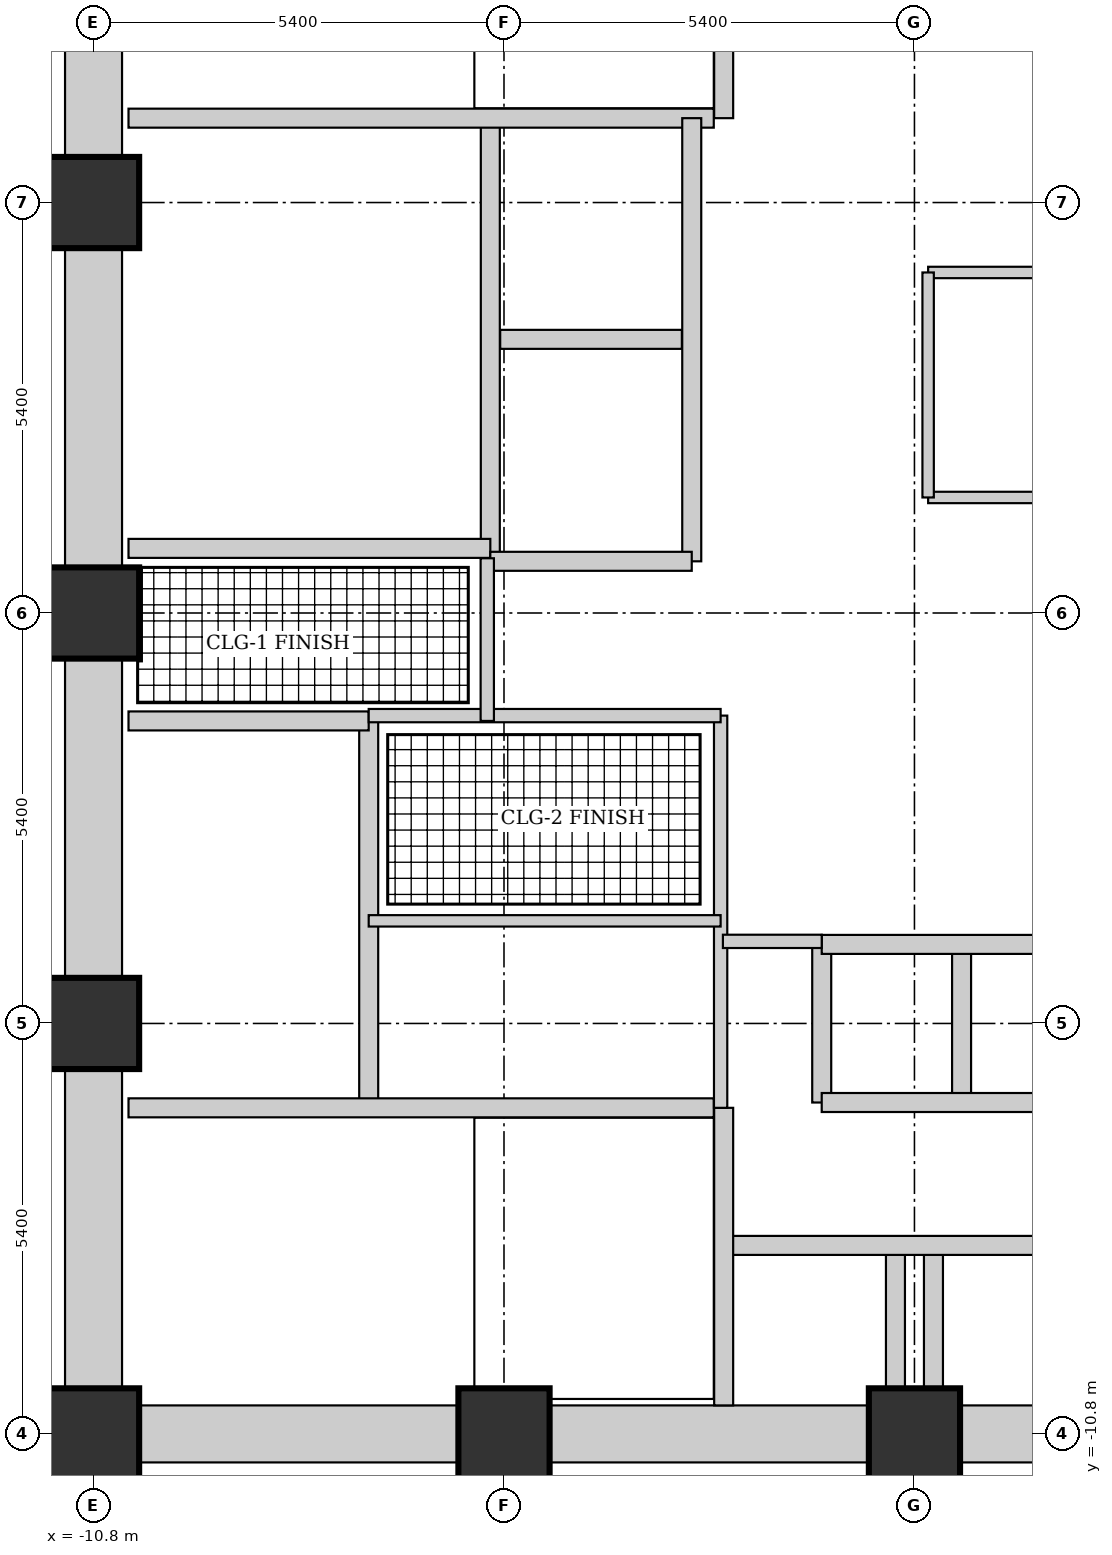
"""IFC4 building model, lengths in metres.
Left out: names, types, materials, properties, quantities, classifications, styles, units other than length and angle.
Written with IfcOpenShell. Run it as: python <this file> out.ifc"""

import sys

from ifc_helpers import new_model, si_unit, direction, frame, frame_2d, origin, origin_2d, place, context, subcontext, project, spatial, rectangle, extrude, element, fill, save


model = new_model("IFC4")
c1 = context("Model", 3, precision=1e-05, world=origin(), true_north=direction((0.0, 1.0)))
c2 = subcontext(c1, "Body", "Model", "MODEL_VIEW")
j1 = project(units=[si_unit("LENGTHUNIT", "METRE"), si_unit("PLANEANGLEUNIT", "RADIAN")], contexts=[c1])
p1 = place(None, origin())
s1 = spatial("IfcSite", under=j1, at=p1, CompositionType="ELEMENT")
p2 = place(p1, origin())
s2 = spatial("IfcBuilding", under=s1, at=p2, CompositionType="ELEMENT")
p3 = place(p2, frame((0.0, 0.0, 22.5)))
s3 = spatial("IfcBuildingStorey", under=s2, at=p3, CompositionType="ELEMENT", Elevation=22.5)
for number, where, z_axis, x_axis in (
    (1, (-10.8, -10.8, 0.0), (0.0, 0.0, 1.0), (1.0, 0.0, 0.0)),
    (2, (-10.8, -5.4, 0.0), (0.0, 0.0, 1.0), (1.0, 0.0, 0.0)),
    (3, (-10.8, 0.0, 0.0), (0.0, 0.0, 1.0), (1.0, 0.0, 0.0)),
    (4, (-10.8, 5.4, 0.0), (0.0, 0.0, 1.0), (1.0, 0.0, 0.0)),
    (5, (-5.4, -10.8, 0.0), (0.0, 0.0, 1.0), (1.0, 0.0, 0.0)),
    (6, (0.0, -10.8, 0.0), (0.0, 0.0, 1.0), (1.0, 0.0, 0.0)),
):
    element("IfcColumn", number, at=place(p3, frame(where, z_axis=z_axis, x_axis=x_axis)), inside=s3, PredefinedType="COLUMN", context=c2, shape_type="SweptSolid", body=[
        extrude(rectangle(XDim=1.2, YDim=1.2, at=origin_2d()), origin(), (0.0, 0.0, 1.0), 3.75),
    ])
for number, where, z_axis, x_axis in (
    (7, (-10.19, -10.8, 0.0), (0.0, 0.0, 1.0), (1.0, 0.0, 0.0)),
    (8, (-10.8, -10.19, 0.0), (0.0, 0.0, 1.0), (0.0, 1.0, 0.0)),
    (9, (-4.79, -10.8, 0.0), (0.0, 0.0, 1.0), (1.0, 0.0, 0.0)),
):
    element("IfcWall", number, at=place(p3, frame(where, z_axis=z_axis, x_axis=x_axis)), inside=s3, PredefinedType="SHEAR", context=c2, shape_type="SweptSolid", body=[
        extrude(rectangle(XDim=4.18, YDim=0.75, at=frame_2d((2.09, 0.0))), origin(), (0.0, 0.0, 1.0), 3.75),
    ])
p4 = place(p3, frame((-10.8, -4.79, 0.0), z_axis=(0.0, 0.0, 1.0), x_axis=(0.0, 1.0, 0.0)))
e10 = element("IfcWall", 10, at=p4, inside=s3, PredefinedType="SHEAR", context=c2, shape_type="SweptSolid", body=[
    extrude(rectangle(XDim=4.18, YDim=0.75, at=frame_2d((2.09, 0.0))), origin(), (0.0, 0.0, 1.0), 3.75),
])
p5 = place(p4, frame((1.54, 0.0, 0.0)))
e11 = element("IfcOpeningElement", 11, at=p5, cuts=e10, PredefinedType="OPENING", context=c2, shape_type="SweptSolid", body=[
    extrude(rectangle(XDim=1.1, YDim=2.1, at=frame_2d((0.55, 1.05))), frame((0.0, 0.385, 0.0), z_axis=(0.0, -1.0, 0.0), x_axis=(1.0, 0.0, 0.0)), (0.0, 0.0, 1.0), 0.77),
])
p6 = place(p3, frame((0.61, -10.8, 0.0), z_axis=(0.0, 0.0, 1.0), x_axis=(1.0, 0.0, 0.0)))
e12 = element("IfcWall", 12, at=p6, inside=s3, PredefinedType="SHEAR", context=c2, shape_type="SweptSolid", body=[
    extrude(rectangle(XDim=4.18, YDim=0.75, at=frame_2d((2.09, 0.0))), origin(), (0.0, 0.0, 1.0), 3.75),
])
p7 = place(p3, frame((-10.8, 0.61, 0.0), z_axis=(0.0, 0.0, 1.0), x_axis=(0.0, 1.0, 0.0)))
e13 = element("IfcWall", 13, at=p7, inside=s3, PredefinedType="SHEAR", context=c2, shape_type="SweptSolid", body=[
    extrude(rectangle(XDim=4.18, YDim=0.75, at=frame_2d((2.09, 0.0))), origin(), (0.0, 0.0, 1.0), 3.75),
])
p8 = place(p7, frame((1.54, 0.0, 0.0)))
e14 = element("IfcOpeningElement", 14, at=p8, cuts=e13, PredefinedType="OPENING", context=c2, shape_type="SweptSolid", body=[
    extrude(rectangle(XDim=1.1, YDim=2.1, at=frame_2d((0.55, 1.05))), frame((0.0, 0.385, 0.0), z_axis=(0.0, -1.0, 0.0), x_axis=(1.0, 0.0, 0.0)), (0.0, 0.0, 1.0), 0.77),
])
p9 = place(p3, frame((-10.8, 6.01, 0.0), z_axis=(0.0, 0.0, 1.0), x_axis=(0.0, 1.0, 0.0)))
e15 = element("IfcWall", 15, at=p9, inside=s3, PredefinedType="SHEAR", context=c2, shape_type="SweptSolid", body=[
    extrude(rectangle(XDim=4.18, YDim=0.75, at=frame_2d((2.09, 0.0))), origin(), (0.0, 0.0, 1.0), 3.75),
])
p10 = place(p3, frame((-5.58, 0.72, 0.0), z_axis=(0.0, 0.0, 1.0), x_axis=(0.0, 1.0, 0.0)))
e16 = element("IfcWall", 16, at=p10, inside=s3, PredefinedType="SHEAR", context=c2, shape_type="SweptSolid", body=[
    extrude(rectangle(XDim=5.79, YDim=0.25, at=frame_2d((2.895, 0.0))), origin(), (0.0, 0.0, 1.0), 3.75),
])
p11 = place(p10, frame((3.35, 0.0, 0.0)))
e17 = element("IfcOpeningElement", 17, at=p11, cuts=e16, PredefinedType="OPENING", context=c2, shape_type="SweptSolid", body=[
    extrude(rectangle(XDim=1.1, YDim=2.1, at=frame_2d((0.55, 1.05))), frame((0.0, 0.135, 0.0), z_axis=(0.0, -1.0, 0.0), x_axis=(1.0, 0.0, 0.0)), (0.0, 0.0, 1.0), 0.27),
])
p12 = place(p3, frame((-10.34, 0.85, 0.0), z_axis=(0.0, 0.0, 1.0), x_axis=(1.0, 0.0, 0.0)))
e18 = element("IfcWall", 18, at=p12, inside=s3, PredefinedType="SHEAR", context=c2, shape_type="SweptSolid", body=[
    extrude(rectangle(XDim=4.76, YDim=0.25, at=frame_2d((2.38, 0.0))), origin(), (0.0, 0.0, 1.0), 3.75),
])
p13 = place(p12, frame((1.2, 0.0, 0.0)))
e19 = element("IfcOpeningElement", 19, at=p13, cuts=e18, PredefinedType="OPENING", context=c2, shape_type="SweptSolid", body=[
    extrude(rectangle(XDim=0.85, YDim=2.1, at=frame_2d((0.425, 1.05))), frame((0.0, 0.135, 0.0), z_axis=(0.0, -1.0, 0.0), x_axis=(1.0, 0.0, 0.0)), (0.0, 0.0, 1.0), 0.27),
])
p14 = place(p3, frame((0.62, -6.34, 0.0), z_axis=(0.0, 0.0, 1.0), x_axis=(0.0, 1.0, 0.0)))
e20 = element("IfcWall", 20, at=p14, inside=s3, PredefinedType="SHEAR", context=c2, shape_type="SweptSolid", body=[
    extrude(rectangle(XDim=1.88, YDim=0.25, at=frame_2d((0.94, 0.0))), origin(), (0.0, 0.0, 1.0), 3.75),
])
for number, where, z_axis, x_axis in (
    (21, (-0.25, -10.2, 0.0), (0.0, 0.0, 1.0), (0.0, 1.0, 0.0)),
    (22, (0.25, -10.2, 0.0), (0.0, 0.0, 1.0), (0.0, 1.0, 0.0)),
):
    element("IfcWall", number, at=place(p3, frame(where, z_axis=z_axis, x_axis=x_axis)), inside=s3, PredefinedType="SHEAR", context=c2, shape_type="SweptSolid", body=[
        extrude(rectangle(XDim=1.76, YDim=0.25, at=frame_2d((0.88, 0.0))), origin(), (0.0, 0.0, 1.0), 3.75),
    ])
p15 = place(p3, frame((-1.22, -6.44, 0.0), z_axis=(0.0, 0.0, 1.0), x_axis=(0.0, 1.0, 0.0)))
e23 = element("IfcWall", 23, at=p15, inside=s3, PredefinedType="SHEAR", context=c2, shape_type="SweptSolid", body=[
    extrude(rectangle(XDim=2.08, YDim=0.25, at=frame_2d((1.04, 0.0))), origin(), (0.0, 0.0, 1.0), 3.75),
])
p16 = place(p3, frame((-1.22, -6.44, 0.0), z_axis=(0.0, 0.0, 1.0), x_axis=(1.0, 0.0, 0.0)))
e24 = element("IfcWall", 24, at=p16, inside=s3, PredefinedType="SHEAR", context=c2, shape_type="SweptSolid", body=[
    extrude(rectangle(XDim=3.67, YDim=0.25, at=frame_2d((1.835, 0.0))), origin(), (0.0, 0.0, 1.0), 3.75),
])
p17 = place(p3, frame((-2.48, -8.32, 0.0), z_axis=(0.0, 0.0, 1.0), x_axis=(1.0, 0.0, 0.0)))
e25 = element("IfcWall", 25, at=p17, inside=s3, PredefinedType="SHEAR", context=c2, shape_type="SweptSolid", body=[
    extrude(rectangle(XDim=4.93, YDim=0.25, at=frame_2d((2.465, 0.0))), origin(), (0.0, 0.0, 1.0), 3.75),
])
p18 = place(p3, frame((-1.22, -4.36, 0.0), z_axis=(0.0, 0.0, 1.0), x_axis=(1.0, 0.0, 0.0)))
e26 = element("IfcWall", 26, at=p18, inside=s3, PredefinedType="SHEAR", context=c2, shape_type="SweptSolid", body=[
    extrude(rectangle(XDim=4.03, YDim=0.25, at=frame_2d((2.015, 0.0))), origin(), (0.0, 0.0, 1.0), 3.75),
])
p19 = place(p3, frame((-2.51, 6.51, 0.0), z_axis=(0.0, 0.0, 1.0), x_axis=(0.0, 1.0, 0.0)))
e27 = element("IfcWall", 27, at=p19, inside=s3, PredefinedType="SHEAR", context=c2, shape_type="SweptSolid", body=[
    extrude(rectangle(XDim=3.915, YDim=0.25, at=frame_2d((1.958, 0.0))), origin(), (0.0, 0.0, 1.0), 3.75),
])
p20 = place(p3, frame((-10.34, 6.51, 0.0), z_axis=(0.0, 0.0, 1.0), x_axis=(1.0, 0.0, 0.0)))
e28 = element("IfcWall", 28, at=p20, inside=s3, PredefinedType="SHEAR", context=c2, shape_type="SweptSolid", body=[
    extrude(rectangle(XDim=7.7, YDim=0.25, at=frame_2d((3.85, 0.0))), origin(), (0.0, 0.0, 1.0), 3.75),
])
p21 = place(p20, frame((0.35, 0.0, 0.0)))
e29 = element("IfcOpeningElement", 29, at=p21, cuts=e28, PredefinedType="OPENING", context=c2, shape_type="SweptSolid", body=[
    extrude(rectangle(XDim=1.1, YDim=2.1, at=frame_2d((0.55, 1.05))), frame((0.0, 0.135, 0.0), z_axis=(0.0, -1.0, 0.0), x_axis=(1.0, 0.0, 0.0)), (0.0, 0.0, 1.0), 0.27),
])
p22 = place(p3, frame((-2.51, -10.425, 0.0), z_axis=(0.0, 0.0, 1.0), x_axis=(0.0, 1.0, 0.0)))
e30 = element("IfcWall", 30, at=p22, inside=s3, PredefinedType="SHEAR", context=c2, shape_type="SweptSolid", body=[
    extrude(rectangle(XDim=3.915, YDim=0.25, at=frame_2d((1.958, 0.0))), origin(), (0.0, 0.0, 1.0), 3.75),
])
p23 = place(p3, frame((-7.18, -6.51, 0.0), z_axis=(0.0, 0.0, 1.0), x_axis=(0.0, 1.0, 0.0)))
e31 = element("IfcWall", 31, at=p23, inside=s3, PredefinedType="SHEAR", context=c2, shape_type="SweptSolid", body=[
    extrude(rectangle(XDim=5.09, YDim=0.25, at=frame_2d((2.545, 0.0))), origin(), (0.0, 0.0, 1.0), 3.75),
])
p24 = place(p3, frame((-10.34, -1.42, 0.0), z_axis=(0.0, 0.0, 1.0), x_axis=(1.0, 0.0, 0.0)))
e32 = element("IfcWall", 32, at=p24, inside=s3, PredefinedType="SHEAR", context=c2, shape_type="SweptSolid", body=[
    extrude(rectangle(XDim=3.16, YDim=0.25, at=frame_2d((1.58, 0.0))), origin(), (0.0, 0.0, 1.0), 3.75),
])
p25 = place(p3, frame((-10.34, -6.51, 0.0), z_axis=(0.0, 0.0, 1.0), x_axis=(1.0, 0.0, 0.0)))
e33 = element("IfcWall", 33, at=p25, inside=s3, PredefinedType="SHEAR", context=c2, shape_type="SweptSolid", body=[
    extrude(rectangle(XDim=7.7, YDim=0.25, at=frame_2d((3.85, 0.0))), origin(), (0.0, 0.0, 1.0), 3.75),
])
p26 = place(p25, frame((0.35, 0.0, 0.0)))
e34 = element("IfcOpeningElement", 34, at=p26, cuts=e33, PredefinedType="OPENING", context=c2, shape_type="SweptSolid", body=[
    extrude(rectangle(XDim=1.1, YDim=2.1, at=frame_2d((0.55, 1.05))), frame((0.0, 0.135, 0.0), z_axis=(0.0, -1.0, 0.0), x_axis=(1.0, 0.0, 0.0)), (0.0, 0.0, 1.0), 0.27),
])
p27 = place(p3, frame((-2.93, 0.68, 0.0), z_axis=(0.0, 0.0, 1.0), x_axis=(0.0, 1.0, 0.0)))
e35 = element("IfcWall", 35, at=p27, inside=s3, PredefinedType="SHEAR", context=c2, shape_type="SweptSolid", body=[
    extrude(rectangle(XDim=5.83, YDim=0.25, at=frame_2d((2.915, 0.0))), origin(), (0.0, 0.0, 1.0), 3.75),
])
p28 = place(p27, frame((0.75, 0.0, 0.0)))
e36 = element("IfcOpeningElement", 36, at=p28, cuts=e35, PredefinedType="OPENING", context=c2, shape_type="SweptSolid", body=[
    extrude(rectangle(XDim=1.2, YDim=2.1, at=frame_2d((0.6, 1.05))), frame((0.0, 0.135, 0.0), z_axis=(0.0, -1.0, 0.0), x_axis=(1.0, 0.0, 0.0)), (0.0, 0.0, 1.0), 0.27),
])
p29 = place(p3, frame((-5.45, 3.6, 0.0), z_axis=(0.0, 0.0, 1.0), x_axis=(1.0, 0.0, 0.0)))
e37 = element("IfcWall", 37, at=p29, inside=s3, PredefinedType="SHEAR", context=c2, shape_type="SweptSolid", body=[
    extrude(rectangle(XDim=2.39, YDim=0.25, at=frame_2d((1.195, 0.0))), origin(), (0.0, 0.0, 1.0), 3.75),
])
p30 = place(p3, frame((-5.58, 0.68, 0.0), z_axis=(0.0, 0.0, 1.0), x_axis=(1.0, 0.0, 0.0)))
e38 = element("IfcWall", 38, at=p30, inside=s3, PredefinedType="SHEAR", context=c2, shape_type="SweptSolid", body=[
    extrude(rectangle(XDim=2.65, YDim=0.25, at=frame_2d((1.325, 0.0))), origin(), (0.0, 0.0, 1.0), 3.75),
])
for number, where, z_axis, x_axis in (
    (39, (0.18, 4.48, 0.0), (0.0, 0.0, 1.0), (1.0, 0.0, 0.0)),
    (40, (0.18, 1.52, 0.0), (0.0, 0.0, 1.0), (1.0, 0.0, 0.0)),
):
    element("IfcWall", number, at=place(p3, frame(where, z_axis=z_axis, x_axis=x_axis)), inside=s3, PredefinedType="PARTITIONING", context=c2, shape_type="SweptSolid", body=[
        extrude(rectangle(XDim=2.67, YDim=0.15, at=frame_2d((1.335, 0.0))), origin(), (0.0, 0.0, 1.0), 3.57),
    ])
p31 = place(p3, frame((0.18, 1.52, 0.0), z_axis=(0.0, 0.0, 1.0), x_axis=(0.0, 1.0, 0.0)))
e41 = element("IfcWall", 41, at=p31, inside=s3, PredefinedType="PARTITIONING", context=c2, shape_type="SweptSolid", body=[
    extrude(rectangle(XDim=2.96, YDim=0.15, at=frame_2d((1.48, 0.0))), origin(), (0.0, 0.0, 1.0), 3.57),
])
p32 = place(p31, frame((0.95, 0.0, 0.0)))
e42 = element("IfcOpeningElement", 42, at=p32, cuts=e41, PredefinedType="OPENING", context=c2, shape_type="SweptSolid", body=[
    extrude(rectangle(XDim=0.85, YDim=2.1, at=frame_2d((0.425, 1.05))), frame((0.0, 0.085, 0.0), z_axis=(0.0, -1.0, 0.0), x_axis=(1.0, 0.0, 0.0)), (0.0, 0.0, 1.0), 0.17),
])
p33 = place(p3, frame((-2.55, -6.51, 0.0), z_axis=(0.0, 0.0, 1.0), x_axis=(0.0, 1.0, 0.0)))
e43 = element("IfcWall", 43, at=p33, inside=s3, PredefinedType="PARTITIONING", context=c2, shape_type="SweptSolid", body=[
    extrude(rectangle(XDim=5.16, YDim=0.175, at=frame_2d((2.58, 0.0))), origin(), (0.0, 0.0, 1.0), 3.57),
])
p34 = place(p33, frame((3.3, 0.0, 0.0)))
e44 = element("IfcOpeningElement", 44, at=p34, cuts=e43, PredefinedType="OPENING", context=c2, shape_type="SweptSolid", body=[
    extrude(rectangle(XDim=0.85, YDim=2.1, at=frame_2d((0.425, 1.05))), frame((0.0, 0.097, 0.0), z_axis=(0.0, -1.0, 0.0), x_axis=(1.0, 0.0, 0.0)), (0.0, 0.0, 1.0), 0.195),
])
p35 = place(p3, frame((-7.18, -4.05, 0.0), z_axis=(0.0, 0.0, 1.0), x_axis=(1.0, 0.0, 0.0)))
e45 = element("IfcWall", 45, at=p35, inside=s3, PredefinedType="PARTITIONING", context=c2, shape_type="SweptSolid", body=[
    extrude(rectangle(XDim=4.63, YDim=0.15, at=frame_2d((2.315, 0.0))), origin(), (0.0, 0.0, 1.0), 3.57),
])
p36 = place(p35, frame((1.0, 0.0, 0.0)))
e46 = element("IfcOpeningElement", 46, at=p36, cuts=e45, PredefinedType="OPENING", context=c2, shape_type="SweptSolid", body=[
    extrude(rectangle(XDim=0.85, YDim=2.1, at=frame_2d((0.425, 1.05))), frame((0.0, 0.085, 0.0), z_axis=(0.0, -1.0, 0.0), x_axis=(1.0, 0.0, 0.0)), (0.0, 0.0, 1.0), 0.17),
])
p37 = place(p3, frame((-7.18, -1.35, 0.0), z_axis=(0.0, 0.0, 1.0), x_axis=(1.0, 0.0, 0.0)))
e47 = element("IfcWall", 47, at=p37, inside=s3, PredefinedType="PARTITIONING", context=c2, shape_type="SweptSolid", body=[
    extrude(rectangle(XDim=4.63, YDim=0.175, at=frame_2d((2.315, 0.0))), origin(), (0.0, 0.0, 1.0), 3.57),
])
p38 = place(p3, frame((-5.62, -1.42, 0.0), z_axis=(0.0, 0.0, 1.0), x_axis=(0.0, 1.0, 0.0)))
e48 = element("IfcWall", 48, at=p38, inside=s3, PredefinedType="PARTITIONING", context=c2, shape_type="SweptSolid", body=[
    extrude(rectangle(XDim=2.14, YDim=0.175, at=frame_2d((1.07, 0.0))), origin(), (0.0, 0.0, 1.0), 3.57),
])
p39 = place(p3, frame((-2.52, -4.32, 0.0), z_axis=(0.0, 0.0, 1.0), x_axis=(1.0, 0.0, 0.0)))
e49 = element("IfcWall", 49, at=p39, inside=s3, PredefinedType="PARTITIONING", context=c2, shape_type="SweptSolid", body=[
    extrude(rectangle(XDim=1.3, YDim=0.175, at=frame_2d((0.65, 0.0))), origin(), (0.0, 0.0, 1.0), 3.57),
])
p40 = place(p39, frame((0.22, 0.0, 0.0)))
e50 = element("IfcOpeningElement", 50, at=p40, cuts=e49, PredefinedType="OPENING", context=c2, shape_type="SweptSolid", body=[
    extrude(rectangle(XDim=0.85, YDim=2.1, at=frame_2d((0.425, 1.05))), frame((0.0, 0.097, 0.0), z_axis=(0.0, -1.0, 0.0), x_axis=(1.0, 0.0, 0.0)), (0.0, 0.0, 1.0), 0.195),
])
p41 = place(p32, origin())
e51 = element("IfcDoor", 51, at=p41, inside=s3, OperationType="SINGLE_SWING_RIGHT", PredefinedType="DOOR", context=c2, shape_type="SweptSolid", body=[
    extrude(rectangle(XDim=0.85, YDim=2.1, at=frame_2d((0.425, 1.05))), frame((0.0, 0.025, 0.0), z_axis=(0.0, -1.0, 0.0), x_axis=(1.0, 0.0, 0.0)), (0.0, 0.0, 1.0), 0.05),
])
fill(e42, e51)
p42 = place(p21, origin())
e52 = element("IfcDoor", 52, at=p42, inside=s3, OperationType="SINGLE_SWING_LEFT", PredefinedType="DOOR", context=c2, shape_type="SweptSolid", body=[
    extrude(rectangle(XDim=1.1, YDim=2.1, at=frame_2d((0.55, 1.05))), frame((0.0, 0.025, 0.0), z_axis=(0.0, -1.0, 0.0), x_axis=(1.0, 0.0, 0.0)), (0.0, 0.0, 1.0), 0.05),
])
fill(e29, e52)
p43 = place(p26, origin())
e53 = element("IfcDoor", 53, at=p43, inside=s3, OperationType="SINGLE_SWING_RIGHT", PredefinedType="DOOR", context=c2, shape_type="SweptSolid", body=[
    extrude(rectangle(XDim=1.1, YDim=2.1, at=frame_2d((0.55, 1.05))), frame((0.0, 0.025, 0.0), z_axis=(0.0, -1.0, 0.0), x_axis=(1.0, 0.0, 0.0)), (0.0, 0.0, 1.0), 0.05),
])
fill(e34, e53)
p44 = place(p8, origin())
e54 = element("IfcDoor", 54, at=p44, inside=s3, OperationType="SINGLE_SWING_LEFT", PredefinedType="DOOR", context=c2, shape_type="SweptSolid", body=[
    extrude(rectangle(XDim=1.1, YDim=2.1, at=frame_2d((0.55, 1.05))), frame((0.0, 0.025, 0.0), z_axis=(0.0, -1.0, 0.0), x_axis=(1.0, 0.0, 0.0)), (0.0, 0.0, 1.0), 0.05),
])
fill(e14, e54)
p45 = place(p5, origin())
e55 = element("IfcDoor", 55, at=p45, inside=s3, OperationType="SINGLE_SWING_LEFT", PredefinedType="DOOR", context=c2, shape_type="SweptSolid", body=[
    extrude(rectangle(XDim=1.1, YDim=2.1, at=frame_2d((0.55, 1.05))), frame((0.0, 0.025, 0.0), z_axis=(0.0, -1.0, 0.0), x_axis=(1.0, 0.0, 0.0)), (0.0, 0.0, 1.0), 0.05),
])
fill(e11, e55)
p46 = place(p13, origin())
e56 = element("IfcDoor", 56, at=p46, inside=s3, OperationType="SINGLE_SWING_RIGHT", PredefinedType="DOOR", context=c2, shape_type="SweptSolid", body=[
    extrude(rectangle(XDim=0.85, YDim=2.1, at=frame_2d((0.425, 1.05))), frame((0.0, 0.025, 0.0), z_axis=(0.0, -1.0, 0.0), x_axis=(1.0, 0.0, 0.0)), (0.0, 0.0, 1.0), 0.05),
])
fill(e19, e56)
p47 = place(p11, origin())
e57 = element("IfcDoor", 57, at=p47, inside=s3, OperationType="SLIDING_TO_LEFT", PredefinedType="DOOR", context=c2, shape_type="SweptSolid", body=[
    extrude(rectangle(XDim=1.1, YDim=2.1, at=frame_2d((0.55, 1.05))), frame((0.0, 0.025, 0.0), z_axis=(0.0, -1.0, 0.0), x_axis=(1.0, 0.0, 0.0)), (0.0, 0.0, 1.0), 0.05),
])
fill(e17, e57)
p48 = place(p28, origin())
e58 = element("IfcDoor", 58, at=p48, inside=s3, OperationType="SLIDING_TO_LEFT", PredefinedType="DOOR", context=c2, shape_type="SweptSolid", body=[
    extrude(rectangle(XDim=1.2, YDim=2.1, at=frame_2d((0.6, 1.05))), frame((0.0, 0.025, 0.0), z_axis=(0.0, -1.0, 0.0), x_axis=(1.0, 0.0, 0.0)), (0.0, 0.0, 1.0), 0.05),
])
fill(e36, e58)
p49 = place(p40, origin())
e59 = element("IfcDoor", 59, at=p49, inside=s3, OperationType="SINGLE_SWING_LEFT", PredefinedType="DOOR", context=c2, shape_type="SweptSolid", body=[
    extrude(rectangle(XDim=0.85, YDim=2.1, at=frame_2d((0.425, 1.05))), frame((0.0, 0.025, 0.0), z_axis=(0.0, -1.0, 0.0), x_axis=(1.0, 0.0, 0.0)), (0.0, 0.0, 1.0), 0.05),
])
fill(e50, e59)
p50 = place(p34, origin())
e60 = element("IfcDoor", 60, at=p50, inside=s3, OperationType="SINGLE_SWING_LEFT", PredefinedType="DOOR", context=c2, shape_type="SweptSolid", body=[
    extrude(rectangle(XDim=0.85, YDim=2.1, at=frame_2d((0.425, 1.05))), frame((0.0, 0.025, 0.0), z_axis=(0.0, -1.0, 0.0), x_axis=(1.0, 0.0, 0.0)), (0.0, 0.0, 1.0), 0.05),
])
fill(e44, e60)
p51 = place(p36, origin())
e61 = element("IfcDoor", 61, at=p51, inside=s3, OperationType="SINGLE_SWING_RIGHT", PredefinedType="DOOR", context=c2, shape_type="SweptSolid", body=[
    extrude(rectangle(XDim=0.85, YDim=2.1, at=frame_2d((0.425, 1.05))), frame((0.0, 0.025, 0.0), z_axis=(0.0, -1.0, 0.0), x_axis=(1.0, 0.0, 0.0)), (0.0, 0.0, 1.0), 0.05),
])
fill(e46, e61)
save(model, sys.argv[1])
